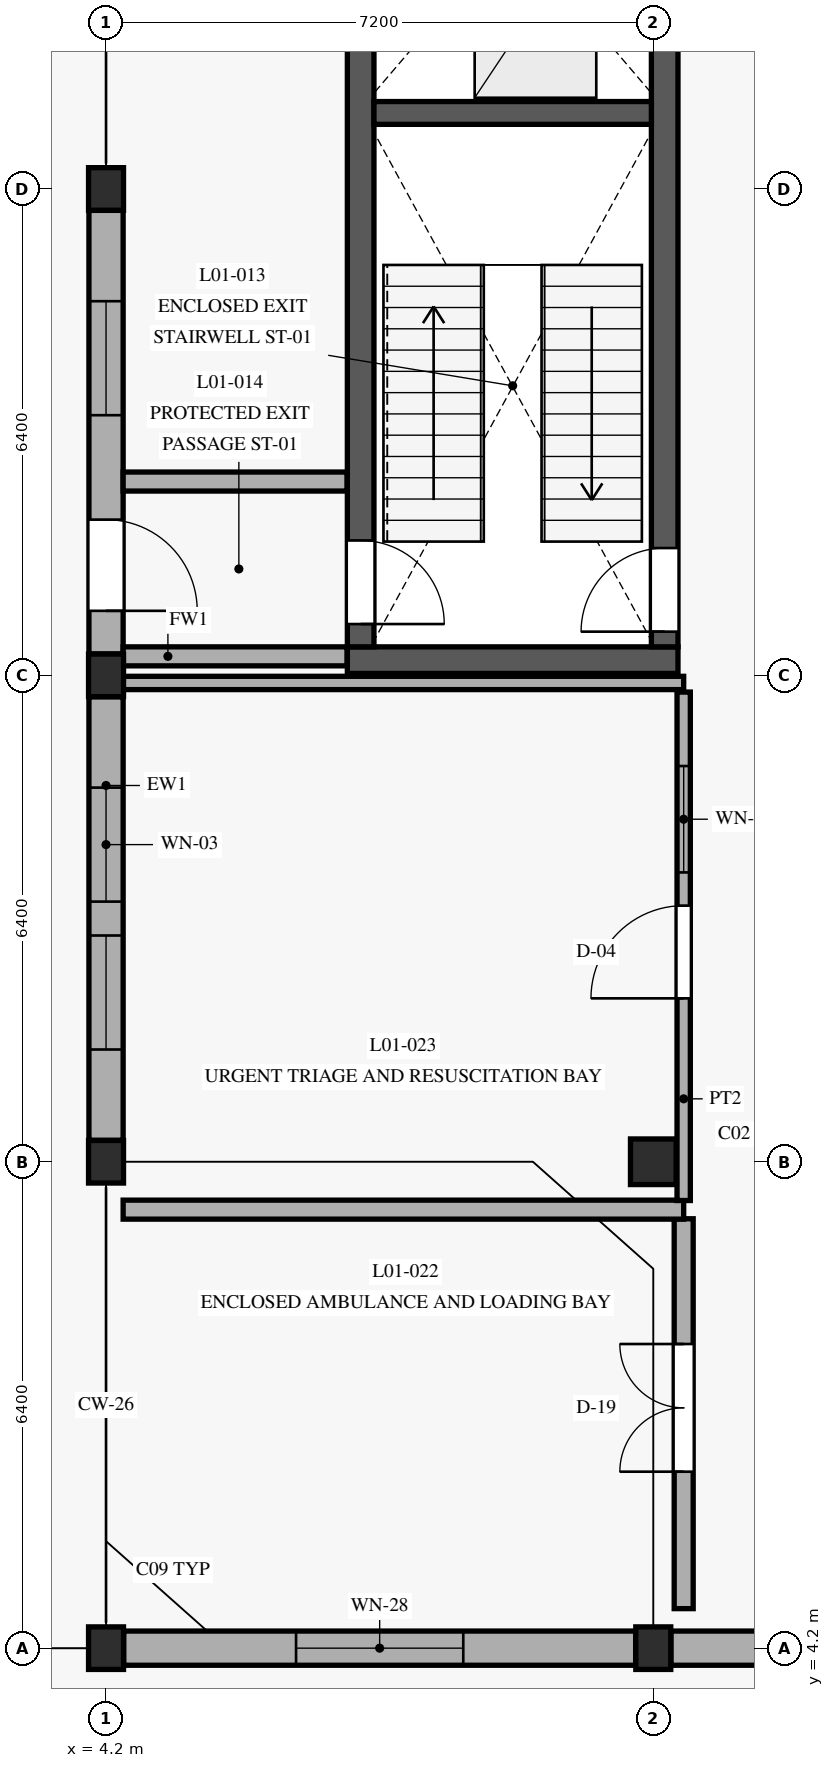
"""IFC4 building model, lengths in metres.
Left out: names, types, materials, properties, quantities, classifications, styles, units other than length and angle.
Written with IfcOpenShell. Run it as: python <this file> out.ifc"""

import sys

from ifc_helpers import new_model, si_unit, direction, frame, frame_2d, origin, origin_with_axes, origin_2d, place, context, subcontext, project, spatial, rectangle, extrude, element, fill, save


model = new_model("IFC4")
c1 = context("Model", 3, precision=1e-05, world=origin(), true_north=direction((0.0, 1.0)))
c2 = subcontext(c1, "Body", "Model", "MODEL_VIEW")
j1 = project(units=[si_unit("LENGTHUNIT", "METRE"), si_unit("PLANEANGLEUNIT", "RADIAN")], contexts=[c1])
p1 = place(None, origin())
s1 = spatial("IfcSite", under=j1, at=p1, CompositionType="ELEMENT")
p2 = place(p1, origin())
s2 = spatial("IfcBuilding", under=s1, at=p2, CompositionType="ELEMENT")
p3 = place(p2, origin())
s3 = spatial("IfcBuildingStorey", under=s2, at=p3, CompositionType="ELEMENT", Elevation=0.0)
for number, where, z_axis, x_axis in (
    (1, (4.2, 4.2, 0.0), (0.0, 0.0, 1.0), (1.0, 0.0, 0.0)),
    (2, (4.2, 10.6, 0.0), (0.0, 0.0, 1.0), (1.0, 0.0, 0.0)),
    (3, (4.2, 17.0, 0.0), (0.0, 0.0, 1.0), (1.0, 0.0, 0.0)),
    (4, (4.2, 23.4, 0.0), (0.0, 0.0, 1.0), (1.0, 0.0, 0.0)),
    (5, (11.4, 4.2, 0.0), (0.0, 0.0, 1.0), (1.0, 0.0, 0.0)),
):
    element("IfcColumn", number, at=place(p3, frame(where, z_axis=z_axis, x_axis=x_axis)), inside=s3, PredefinedType="COLUMN", context=c2, shape_type="SweptSolid", body=[
        extrude(rectangle(XDim=0.46, YDim=0.56, at=origin_2d()), origin(), (0.0, 0.0, 1.0), 4.8),
    ])
p4 = place(p3, frame((11.4, 10.6, 0.0), z_axis=(0.0, 0.0, 1.0), x_axis=(1.0, 0.0, 0.0)))
e6 = element("IfcColumn", 6, at=p4, inside=s3, PredefinedType="COLUMN", context=c2, shape_type="SweptSolid", body=[
    extrude(rectangle(XDim=0.6, YDim=0.6, at=origin_2d()), origin(), (0.0, 0.0, 1.0), 4.8),
])
p5 = place(p3, frame((7.375, 17.2, 0.0), z_axis=(0.0, 0.0, 1.0), x_axis=(1.0, 0.0, 0.0)))
e7 = element("IfcWall", 7, at=p5, inside=s3, PredefinedType="SHEAR", context=c2, shape_type="SweptSolid", body=[
    extrude(rectangle(XDim=4.35, YDim=0.35, at=frame_2d((2.175, 0.0))), origin(), (0.0, 0.0, 1.0), 4.42),
])
p6 = place(p3, frame((7.55, 29.025, 0.0), z_axis=(0.0, 0.0, 1.0), x_axis=(0.0, -1.0, 0.0)))
e8 = element("IfcWall", 8, at=p6, inside=s3, PredefinedType="SHEAR", context=c2, shape_type="SweptSolid", body=[
    extrude(rectangle(XDim=11.65, YDim=0.35, at=frame_2d((5.825, 0.0))), origin(), (0.0, 0.0, 1.0), 4.42),
])
p7 = place(p6, frame((10.25, 0.0, 0.0)))
e9 = element("IfcOpeningElement", 9, at=p7, cuts=e8, PredefinedType="OPENING", context=c2, shape_type="SweptSolid", body=[
    extrude(rectangle(XDim=1.1, YDim=2.2, at=frame_2d((0.55, 1.1))), frame((0.0, 0.185, 0.0), z_axis=(0.0, -1.0, 0.0), x_axis=(1.0, 0.0, 0.0)), (0.0, 0.0, 1.0), 0.37),
])
p8 = place(p3, frame((11.55, 17.375, 0.0), z_axis=(0.0, 0.0, 1.0), x_axis=(0.0, 1.0, 0.0)))
e10 = element("IfcWall", 10, at=p8, inside=s3, PredefinedType="SHEAR", context=c2, shape_type="SweptSolid", body=[
    extrude(rectangle(XDim=11.65, YDim=0.35, at=frame_2d((5.825, 0.0))), origin(), (0.0, 0.0, 1.0), 4.42),
])
p9 = place(p8, frame((0.2, 0.0, 0.0)))
e11 = element("IfcOpeningElement", 11, at=p9, cuts=e10, PredefinedType="OPENING", context=c2, shape_type="SweptSolid", body=[
    extrude(rectangle(XDim=1.1, YDim=2.2, at=frame_2d((0.55, 1.1))), frame((0.0, 0.185, 0.0), z_axis=(0.0, -1.0, 0.0), x_axis=(1.0, 0.0, 0.0)), (0.0, 0.0, 1.0), 0.37),
])
p10 = place(p8, frame((7.85, 0.0, 0.0)))
e12 = element("IfcOpeningElement", 12, at=p10, cuts=e10, PredefinedType="OPENING", context=c2, shape_type="SweptSolid", body=[
    extrude(rectangle(XDim=1.15, YDim=2.2, at=frame_2d((0.575, 1.1))), frame((0.0, 0.185, 0.0), z_axis=(0.0, -1.0, 0.0), x_axis=(1.0, 0.0, 0.0)), (0.0, 0.0, 1.0), 0.37),
])
p11 = place(p8, frame((10.115, 0.0, 0.0)))
e13 = element("IfcOpeningElement", 13, at=p11, cuts=e10, PredefinedType="OPENING", context=c2, shape_type="SweptSolid", body=[
    extrude(rectangle(XDim=1.02, YDim=2.15, at=frame_2d((0.51, 1.075))), frame((0.0, 0.185, 0.0), z_axis=(0.0, -1.0, 0.0), x_axis=(1.0, 0.0, 0.0)), (0.0, 0.0, 1.0), 0.37),
])
p12 = place(p3, frame((7.725, 24.4, 0.0), z_axis=(0.0, 0.0, 1.0), x_axis=(1.0, 0.0, 0.0)))
e14 = element("IfcWall", 14, at=p12, inside=s3, PredefinedType="SHEAR", context=c2, shape_type="SweptSolid", body=[
    extrude(rectangle(XDim=3.65, YDim=0.3, at=frame_2d((1.825, 0.0))), origin(), (0.0, 0.0, 1.0), 4.42),
])
p13 = place(p3, frame((4.2, 16.718, 0.0), z_axis=(0.0, 0.0, 1.0), x_axis=(0.0, -1.0, 0.0)))
e15 = element("IfcWall", 15, at=p13, inside=s3, PredefinedType="SOLIDWALL", context=c2, shape_type="SweptSolid", body=[
    extrude(rectangle(XDim=5.836, YDim=0.45, at=frame_2d((2.918, 0.0))), origin(), (0.0, 0.0, 1.0), 3.87),
])
p14 = place(p13, frame((1.195, 0.0, 0.65)))
e16 = element("IfcOpeningElement", 16, at=p14, cuts=e15, PredefinedType="OPENING", context=c2, shape_type="SweptSolid", body=[
    extrude(rectangle(XDim=1.5, YDim=2.2, at=frame_2d((0.75, 1.1))), frame((0.0, 0.235, 0.0), z_axis=(0.0, -1.0, 0.0), x_axis=(1.0, 0.0, 0.0)), (0.0, 0.0, 1.0), 0.47),
])
p15 = place(p13, frame((3.141, 0.0, 0.65)))
e17 = element("IfcOpeningElement", 17, at=p15, cuts=e15, PredefinedType="OPENING", context=c2, shape_type="SweptSolid", body=[
    extrude(rectangle(XDim=1.5, YDim=2.2, at=frame_2d((0.75, 1.1))), frame((0.0, 0.235, 0.0), z_axis=(0.0, -1.0, 0.0), x_axis=(1.0, 0.0, 0.0)), (0.0, 0.0, 1.0), 0.47),
])
p16 = place(p3, frame((4.2, 23.118, 0.0), z_axis=(0.0, 0.0, 1.0), x_axis=(0.0, -1.0, 0.0)))
e18 = element("IfcWall", 18, at=p16, inside=s3, PredefinedType="SOLIDWALL", context=c2, shape_type="SweptSolid", body=[
    extrude(rectangle(XDim=5.836, YDim=0.45, at=frame_2d((2.918, 0.0))), origin(), (0.0, 0.0, 1.0), 3.87),
])
p17 = place(p16, frame((4.069, 0.0, 0.0)))
e19 = element("IfcOpeningElement", 19, at=p17, cuts=e18, PredefinedType="OPENING", context=c2, shape_type="SweptSolid", body=[
    extrude(rectangle(XDim=1.2, YDim=2.25, at=frame_2d((0.6, 1.125))), frame((0.0, 0.235, 0.0), z_axis=(0.0, -1.0, 0.0), x_axis=(1.0, 0.0, 0.0)), (0.0, 0.0, 1.0), 0.47),
])
p18 = place(p16, frame((1.195, 0.0, 0.65)))
e20 = element("IfcOpeningElement", 20, at=p18, cuts=e18, PredefinedType="OPENING", context=c2, shape_type="SweptSolid", body=[
    extrude(rectangle(XDim=1.5, YDim=2.2, at=frame_2d((0.75, 1.1))), frame((0.0, 0.235, 0.0), z_axis=(0.0, -1.0, 0.0), x_axis=(1.0, 0.0, 0.0)), (0.0, 0.0, 1.0), 0.47),
])
p19 = place(p3, frame((4.432, 4.2, 0.0), z_axis=(0.0, 0.0, 1.0), x_axis=(1.0, 0.0, 0.0)))
e21 = element("IfcWall", 21, at=p19, inside=s3, PredefinedType="SOLIDWALL", context=c2, shape_type="SweptSolid", body=[
    extrude(rectangle(XDim=6.736, YDim=0.45, at=frame_2d((3.368, 0.0))), origin(), (0.0, 0.0, 1.0), 3.92),
])
p20 = place(p19, frame((2.268, 0.0, 2.6)))
e22 = element("IfcOpeningElement", 22, at=p20, cuts=e21, PredefinedType="OPENING", context=c2, shape_type="SweptSolid", body=[
    extrude(rectangle(XDim=2.2, YDim=1.1, at=frame_2d((1.1, 0.55))), frame((0.0, 0.235, 0.0), z_axis=(0.0, -1.0, 0.0), x_axis=(1.0, 0.0, 0.0)), (0.0, 0.0, 1.0), 0.47),
])
p21 = place(p3, frame((11.632, 4.2, 0.0), z_axis=(0.0, 0.0, 1.0), x_axis=(1.0, 0.0, 0.0)))
e23 = element("IfcWall", 23, at=p21, inside=s3, PredefinedType="SOLIDWALL", context=c2, shape_type="SweptSolid", body=[
    extrude(rectangle(XDim=7.336, YDim=0.45, at=frame_2d((3.668, 0.0))), origin(), (0.0, 0.0, 1.0), 3.92),
])
p22 = place(p21, frame((2.568, 0.0, 2.6)))
e24 = element("IfcOpeningElement", 24, at=p22, cuts=e23, PredefinedType="OPENING", context=c2, shape_type="SweptSolid", body=[
    extrude(rectangle(XDim=2.2, YDim=1.1, at=frame_2d((1.1, 0.55))), frame((0.0, 0.235, 0.0), z_axis=(0.0, -1.0, 0.0), x_axis=(1.0, 0.0, 0.0)), (0.0, 0.0, 1.0), 0.47),
])
for number, where, z_axis, x_axis in (
    (25, (4.425, 17.25, 0.0), (0.0, 0.0, 1.0), (1.0, 0.0, 0.0)),
    (26, (4.425, 19.55, 0.0), (0.0, 0.0, 1.0), (1.0, 0.0, 0.0)),
):
    element("IfcWall", number, at=place(p3, frame(where, z_axis=z_axis, x_axis=x_axis)), inside=s3, PredefinedType="SOLIDWALL", context=c2, shape_type="SweptSolid", body=[
        extrude(rectangle(XDim=2.945, YDim=0.25, at=frame_2d((1.473, 0.0))), origin(), (0.0, 0.0, 1.0), 3.865),
    ])
p23 = place(p3, frame((11.8, 4.72, 0.0), z_axis=(0.0, 0.0, 1.0), x_axis=(0.0, 1.0, 0.0)))
e27 = element("IfcWall", 27, at=p23, inside=s3, PredefinedType="SOLIDWALL", context=c2, shape_type="SweptSolid", body=[
    extrude(rectangle(XDim=5.13, YDim=0.25, at=frame_2d((2.565, 0.0))), origin(), (0.0, 0.0, 1.0), 3.895),
])
p24 = place(p23, frame((1.802, 0.0, 0.0)))
e28 = element("IfcOpeningElement", 28, at=p24, cuts=e27, PredefinedType="OPENING", context=c2, shape_type="SweptSolid", body=[
    extrude(rectangle(XDim=1.68, YDim=2.25, at=frame_2d((0.84, 1.125))), frame((0.0, 0.135, 0.0), z_axis=(0.0, -1.0, 0.0), x_axis=(1.0, 0.0, 0.0)), (0.0, 0.0, 1.0), 0.27),
])
p25 = place(p3, frame((4.425, 9.97, 0.0), z_axis=(0.0, 0.0, 1.0), x_axis=(1.0, 0.0, 0.0)))
e29 = element("IfcWall", 29, at=p25, inside=s3, PredefinedType="SOLIDWALL", context=c2, shape_type="SweptSolid", body=[
    extrude(rectangle(XDim=7.375, YDim=0.25, at=frame_2d((3.688, 0.0))), origin(), (0.0, 0.0, 1.0), 3.865),
])
p26 = place(p3, frame((11.8, 10.09, 0.0), z_axis=(0.0, 0.0, 1.0), x_axis=(0.0, 1.0, 0.0)))
e30 = element("IfcWall", 30, at=p26, inside=s3, PredefinedType="PARTITIONING", context=c2, shape_type="SweptSolid", body=[
    extrude(rectangle(XDim=6.69, YDim=0.175, at=frame_2d((3.345, 0.0))), origin(), (0.0, 0.0, 1.0), 3.895),
])
p27 = place(p26, frame((2.66, 0.0, 0.0)))
e31 = element("IfcOpeningElement", 31, at=p27, cuts=e30, PredefinedType="OPENING", context=c2, shape_type="SweptSolid", body=[
    extrude(rectangle(XDim=1.22, YDim=2.2, at=frame_2d((0.61, 1.1))), frame((0.0, 0.098, 0.0), z_axis=(0.0, -1.0, 0.0), x_axis=(1.0, 0.0, 0.0)), (0.0, 0.0, 1.0), 0.195),
])
p28 = place(p26, frame((4.317, 0.0, 1.05)))
e32 = element("IfcOpeningElement", 32, at=p28, cuts=e30, PredefinedType="OPENING", context=c2, shape_type="SweptSolid", body=[
    extrude(rectangle(XDim=1.4, YDim=1.2, at=frame_2d((0.7, 0.6))), frame((0.0, 0.098, 0.0), z_axis=(0.0, -1.0, 0.0), x_axis=(1.0, 0.0, 0.0)), (0.0, 0.0, 1.0), 0.195),
])
p29 = place(p3, frame((4.425, 16.9, 0.0), z_axis=(0.0, 0.0, 1.0), x_axis=(1.0, 0.0, 0.0)))
e33 = element("IfcWall", 33, at=p29, inside=s3, PredefinedType="PARTITIONING", context=c2, shape_type="SweptSolid", body=[
    extrude(rectangle(XDim=7.375, YDim=0.175, at=frame_2d((3.688, 0.0))), origin(), (0.0, 0.0, 1.0), 3.895),
])
p30 = place(p9, origin_with_axes())
e34 = element("IfcDoor", 34, at=p30, inside=s3, OperationType="SINGLE_SWING_LEFT", PredefinedType="DOOR", context=c2, shape_type="SweptSolid", body=[
    extrude(rectangle(XDim=1.1, YDim=2.2, at=frame_2d((0.55, 1.1))), frame((0.0, 0.025, 0.0), z_axis=(0.0, -1.0, 0.0), x_axis=(1.0, 0.0, 0.0)), (0.0, 0.0, 1.0), 0.05),
])
fill(e11, e34)
p31 = place(p7, frame((1.1, 0.0, 0.0), z_axis=(0.0, 0.0, 1.0), x_axis=(-1.0, 0.0, 0.0)))
e35 = element("IfcDoor", 35, at=p31, inside=s3, OperationType="SINGLE_SWING_LEFT", PredefinedType="DOOR", context=c2, shape_type="SweptSolid", body=[
    extrude(rectangle(XDim=1.1, YDim=2.2, at=frame_2d((0.55, 1.1))), frame((0.0, 0.025, 0.0), z_axis=(0.0, -1.0, 0.0), x_axis=(1.0, 0.0, 0.0)), (0.0, 0.0, 1.0), 0.05),
])
fill(e9, e35)
p32 = place(p14, origin_with_axes())
e36 = element("IfcWindow", 36, at=p32, inside=s3, PartitioningType="SINGLE_PANEL", PredefinedType="WINDOW", context=c2, shape_type="SweptSolid", body=[
    extrude(rectangle(XDim=1.5, YDim=2.2, at=frame_2d((0.75, 1.1))), frame((0.0, 0.03, 0.0), z_axis=(0.0, -1.0, 0.0), x_axis=(1.0, 0.0, 0.0)), (0.0, 0.0, 1.0), 0.06),
])
fill(e16, e36)
p33 = place(p15, origin_with_axes())
e37 = element("IfcWindow", 37, at=p33, inside=s3, PartitioningType="SINGLE_PANEL", PredefinedType="WINDOW", context=c2, shape_type="SweptSolid", body=[
    extrude(rectangle(XDim=1.5, YDim=2.2, at=frame_2d((0.75, 1.1))), frame((0.0, 0.03, 0.0), z_axis=(0.0, -1.0, 0.0), x_axis=(1.0, 0.0, 0.0)), (0.0, 0.0, 1.0), 0.06),
])
fill(e17, e37)
p34 = place(p17, frame((1.2, 0.0, 0.0), z_axis=(0.0, 0.0, 1.0), x_axis=(-1.0, 0.0, 0.0)))
e38 = element("IfcDoor", 38, at=p34, inside=s3, OperationType="SINGLE_SWING_LEFT", PredefinedType="DOOR", context=c2, shape_type="SweptSolid", body=[
    extrude(rectangle(XDim=1.2, YDim=2.25, at=frame_2d((0.6, 1.125))), frame((0.0, 0.025, 0.0), z_axis=(0.0, -1.0, 0.0), x_axis=(1.0, 0.0, 0.0)), (0.0, 0.0, 1.0), 0.05),
])
fill(e19, e38)
p35 = place(p18, origin_with_axes())
e39 = element("IfcWindow", 39, at=p35, inside=s3, PartitioningType="SINGLE_PANEL", PredefinedType="WINDOW", context=c2, shape_type="SweptSolid", body=[
    extrude(rectangle(XDim=1.5, YDim=2.2, at=frame_2d((0.75, 1.1))), frame((0.0, 0.03, 0.0), z_axis=(0.0, -1.0, 0.0), x_axis=(1.0, 0.0, 0.0)), (0.0, 0.0, 1.0), 0.06),
])
fill(e20, e39)
p36 = place(p20, origin_with_axes())
e40 = element("IfcWindow", 40, at=p36, inside=s3, PartitioningType="SINGLE_PANEL", PredefinedType="WINDOW", context=c2, shape_type="SweptSolid", body=[
    extrude(rectangle(XDim=2.2, YDim=1.1, at=frame_2d((1.1, 0.55))), frame((0.0, 0.03, 0.0), z_axis=(0.0, -1.0, 0.0), x_axis=(1.0, 0.0, 0.0)), (0.0, 0.0, 1.0), 0.06),
])
fill(e22, e40)
p37 = place(p24, origin_with_axes())
e41 = element("IfcDoor", 41, at=p37, inside=s3, OperationType="DOUBLE_DOOR_SINGLE_SWING", PredefinedType="DOOR", context=c2, shape_type="SweptSolid", body=[
    extrude(rectangle(XDim=1.68, YDim=2.25, at=frame_2d((0.84, 1.125))), frame((0.0, 0.025, 0.0), z_axis=(0.0, -1.0, 0.0), x_axis=(1.0, 0.0, 0.0)), (0.0, 0.0, 1.0), 0.05),
])
fill(e28, e41)
p38 = place(p27, origin_with_axes())
e42 = element("IfcDoor", 42, at=p38, inside=s3, OperationType="SINGLE_SWING_LEFT", PredefinedType="DOOR", context=c2, shape_type="SweptSolid", body=[
    extrude(rectangle(XDim=1.22, YDim=2.2, at=frame_2d((0.61, 1.1))), frame((0.0, 0.025, 0.0), z_axis=(0.0, -1.0, 0.0), x_axis=(1.0, 0.0, 0.0)), (0.0, 0.0, 1.0), 0.05),
])
fill(e31, e42)
p39 = place(p28, origin_with_axes())
e43 = element("IfcWindow", 43, at=p39, inside=s3, PartitioningType="SINGLE_PANEL", PredefinedType="WINDOW", context=c2, shape_type="SweptSolid", body=[
    extrude(rectangle(XDim=1.4, YDim=1.2, at=frame_2d((0.7, 0.6))), frame((0.0, 0.03, 0.0), z_axis=(0.0, -1.0, 0.0), x_axis=(1.0, 0.0, 0.0)), (0.0, 0.0, 1.0), 0.06),
])
fill(e32, e43)
save(model, sys.argv[1])
